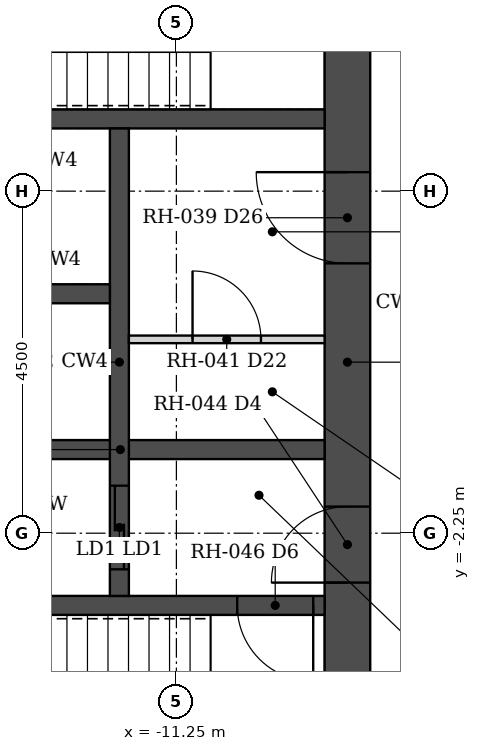
"""IFC4 building model, lengths in metres.
Left out: names, types, materials, properties, quantities, classifications, styles, units other than length and angle.
Written with IfcOpenShell. Run it as: python <this file> out.ifc"""

import sys

from ifc_helpers import new_model, si_unit, direction, frame, frame_2d, origin, place, context, subcontext, project, spatial, rectangle, extrude, element, fill, save


model = new_model("IFC4")
c1 = context("Model", 3, precision=1e-05, world=origin(), true_north=direction((0.0, 1.0)))
c2 = subcontext(c1, "Body", "Model", "MODEL_VIEW")
j1 = project(units=[si_unit("LENGTHUNIT", "METRE"), si_unit("PLANEANGLEUNIT", "RADIAN")], contexts=[c1])
p1 = place(None, origin())
s1 = spatial("IfcSite", under=j1, at=p1, CompositionType="ELEMENT")
p2 = place(p1, origin())
s2 = spatial("IfcBuilding", under=s1, at=p2, CompositionType="ELEMENT")
p3 = place(p2, frame((0.0, 0.0, 100.0)))
s3 = spatial("IfcBuildingStorey", under=s2, at=p3, CompositionType="ELEMENT", Elevation=100.0)
p4 = place(p3, frame((-9.0, -6.45, 0.0), z_axis=(0.0, 0.0, 1.0), x_axis=(0.0, 1.0, 0.0)))
e1 = element("IfcWall", 1, at=p4, inside=s3, PredefinedType="SHEAR", context=c2, shape_type="SweptSolid", body=[
    extrude(rectangle(XDim=12.9, YDim=0.6, at=frame_2d((6.45, 0.0))), origin(), (0.0, 0.0, 1.0), 3.5),
])
p5 = place(p4, frame((3.55, 0.0, 0.0)))
e2 = element("IfcOpeningElement", 2, at=p5, cuts=e1, PredefinedType="OPENING", context=c2, shape_type="SweptSolid", body=[
    extrude(rectangle(XDim=1.0, YDim=2.1, at=frame_2d((0.5, 1.05))), frame((0.0, 0.31, 0.0), z_axis=(0.0, -1.0, 0.0), x_axis=(1.0, 0.0, 0.0)), (0.0, 0.0, 1.0), 0.62),
])
p6 = place(p4, frame((7.75, 0.0, 0.0)))
e3 = element("IfcOpeningElement", 3, at=p6, cuts=e1, PredefinedType="OPENING", context=c2, shape_type="SweptSolid", body=[
    extrude(rectangle(XDim=1.2, YDim=2.1, at=frame_2d((0.6, 1.05))), frame((0.0, 0.31, 0.0), z_axis=(0.0, -1.0, 0.0), x_axis=(1.0, 0.0, 0.0)), (0.0, 0.0, 1.0), 0.62),
])
p7 = place(p4, frame((10.85, 0.0, 0.0)))
e4 = element("IfcOpeningElement", 4, at=p7, cuts=e1, PredefinedType="OPENING", context=c2, shape_type="SweptSolid", body=[
    extrude(rectangle(XDim=1.0, YDim=2.1, at=frame_2d((0.5, 1.05))), frame((0.0, 0.31, 0.0), z_axis=(0.0, -1.0, 0.0), x_axis=(1.0, 0.0, 0.0)), (0.0, 0.0, 1.0), 0.62),
])
p8 = place(p3, frame((-9.3, -3.2, 0.0), z_axis=(0.0, 0.0, 1.0), x_axis=(-1.0, 0.0, 0.0)))
e5 = element("IfcWall", 5, at=p8, inside=s3, PredefinedType="SHEAR", context=c2, shape_type="SweptSolid", body=[
    extrude(rectangle(XDim=8.4, YDim=0.25, at=frame_2d((4.2, 0.0))), origin(), (0.0, 0.0, 1.0), 3.5),
])
p9 = place(p8, frame((0.15, 0.0, 0.0)))
e6 = element("IfcOpeningElement", 6, at=p9, cuts=e5, PredefinedType="OPENING", context=c2, shape_type="SweptSolid", body=[
    extrude(rectangle(XDim=1.0, YDim=2.1, at=frame_2d((0.5, 1.05))), frame((0.0, 0.135, 0.0), z_axis=(0.0, -1.0, 0.0), x_axis=(1.0, 0.0, 0.0)), (0.0, 0.0, 1.0), 0.27),
])
p10 = place(p3, frame((-9.3, 3.2, 0.0), z_axis=(0.0, 0.0, 1.0), x_axis=(-1.0, 0.0, 0.0)))
e7 = element("IfcWall", 7, at=p10, inside=s3, PredefinedType="SHEAR", context=c2, shape_type="SweptSolid", body=[
    extrude(rectangle(XDim=8.4, YDim=0.25, at=frame_2d((4.2, 0.0))), origin(), (0.0, 0.0, 1.0), 3.5),
])
p11 = place(p3, frame((-9.3, -1.15, 0.0), z_axis=(0.0, 0.0, 1.0), x_axis=(-1.0, 0.0, 0.0)))
e8 = element("IfcWall", 8, at=p11, inside=s3, PredefinedType="SHEAR", context=c2, shape_type="SweptSolid", body=[
    extrude(rectangle(XDim=5.375, YDim=0.25, at=frame_2d((2.688, 0.0))), origin(), (0.0, 0.0, 1.0), 3.5),
])
p12 = place(p3, frame((-12.0, -3.075, 0.0), z_axis=(0.0, 0.0, 1.0), x_axis=(0.0, 1.0, 0.0)))
e9 = element("IfcWall", 9, at=p12, inside=s3, PredefinedType="SHEAR", context=c2, shape_type="SweptSolid", body=[
    extrude(rectangle(XDim=6.15, YDim=0.25, at=frame_2d((3.075, 0.0))), origin(), (0.0, 0.0, 1.0), 3.5),
])
p13 = place(p12, frame((0.35, 0.0, 0.0)))
e10 = element("IfcOpeningElement", 10, at=p13, cuts=e9, PredefinedType="OPENING", context=c2, shape_type="SweptSolid", body=[
    extrude(rectangle(XDim=1.1, YDim=2.1, at=frame_2d((0.55, 1.05))), frame((0.0, 0.135, 0.0), z_axis=(0.0, -1.0, 0.0), x_axis=(1.0, 0.0, 0.0)), (0.0, 0.0, 1.0), 0.27),
])
p14 = place(p3, frame((-12.125, 0.9, 0.0), z_axis=(0.0, 0.0, 1.0), x_axis=(-1.0, 0.0, 0.0)))
e11 = element("IfcWall", 11, at=p14, inside=s3, PredefinedType="SHEAR", context=c2, shape_type="SweptSolid", body=[
    extrude(rectangle(XDim=2.55, YDim=0.25, at=frame_2d((1.275, 0.0))), origin(), (0.0, 0.0, 1.0), 3.5),
])
p15 = place(p3, frame((-11.875, 0.3, 0.0), z_axis=(0.0, 0.0, 1.0), x_axis=(1.0, 0.0, 0.0)))
e12 = element("IfcWall", 12, at=p15, inside=s3, PredefinedType="PARTITIONING", context=c2, shape_type="SweptSolid", body=[
    extrude(rectangle(XDim=2.575, YDim=0.1, at=frame_2d((1.288, 0.0))), origin(), (0.0, 0.0, 1.0), 2.373),
])
p16 = place(p15, frame((0.837, 0.0, 0.0)))
e13 = element("IfcOpeningElement", 13, at=p16, cuts=e12, PredefinedType="OPENING", context=c2, shape_type="SweptSolid", body=[
    extrude(rectangle(XDim=0.9, YDim=2.1, at=frame_2d((0.45, 1.05))), frame((0.0, 0.06, 0.0), z_axis=(0.0, -1.0, 0.0), x_axis=(1.0, 0.0, 0.0)), (0.0, 0.0, 1.0), 0.12),
])
p17 = place(p5, origin())
e14 = element("IfcDoor", 14, at=p17, inside=s3, OperationType="SINGLE_SWING_LEFT", PredefinedType="DOOR", context=c2, shape_type="SweptSolid", body=[
    extrude(rectangle(XDim=1.0, YDim=2.1, at=frame_2d((0.5, 1.05))), frame((0.0, 0.025, 0.0), z_axis=(0.0, -1.0, 0.0), x_axis=(1.0, 0.0, 0.0)), (0.0, 0.0, 1.0), 0.05),
])
fill(e2, e14)
p18 = place(p9, origin())
e15 = element("IfcDoor", 15, at=p18, inside=s3, OperationType="SINGLE_SWING_LEFT", PredefinedType="DOOR", context=c2, shape_type="SweptSolid", body=[
    extrude(rectangle(XDim=1.0, YDim=2.1, at=frame_2d((0.5, 1.05))), frame((0.0, 0.025, 0.0), z_axis=(0.0, -1.0, 0.0), x_axis=(1.0, 0.0, 0.0)), (0.0, 0.0, 1.0), 0.05),
])
fill(e6, e15)
p19 = place(p6, origin())
e16 = element("IfcDoor", 16, at=p19, inside=s3, OperationType="SINGLE_SWING_RIGHT", PredefinedType="DOOR", context=c2, shape_type="SweptSolid", body=[
    extrude(rectangle(XDim=1.2, YDim=2.1, at=frame_2d((0.6, 1.05))), frame((0.0, 0.025, 0.0), z_axis=(0.0, -1.0, 0.0), x_axis=(1.0, 0.0, 0.0)), (0.0, 0.0, 1.0), 0.05),
])
fill(e3, e16)
p20 = place(p16, origin())
e17 = element("IfcDoor", 17, at=p20, inside=s3, OperationType="SINGLE_SWING_LEFT", PredefinedType="DOOR", context=c2, shape_type="SweptSolid", body=[
    extrude(rectangle(XDim=0.9, YDim=2.1, at=frame_2d((0.45, 1.05))), frame((0.0, 0.025, 0.0), z_axis=(0.0, -1.0, 0.0), x_axis=(1.0, 0.0, 0.0)), (0.0, 0.0, 1.0), 0.05),
])
fill(e13, e17)
p21 = place(p13, origin())
e18 = element("IfcDoor", 18, at=p21, inside=s3, OperationType="DOUBLE_DOOR_SLIDING", PredefinedType="DOOR", context=c2, shape_type="SweptSolid", body=[
    extrude(rectangle(XDim=1.1, YDim=2.1, at=frame_2d((0.55, 1.05))), frame((0.0, 0.025, 0.0), z_axis=(0.0, -1.0, 0.0), x_axis=(1.0, 0.0, 0.0)), (0.0, 0.0, 1.0), 0.05),
])
fill(e10, e18)
save(model, sys.argv[1])
